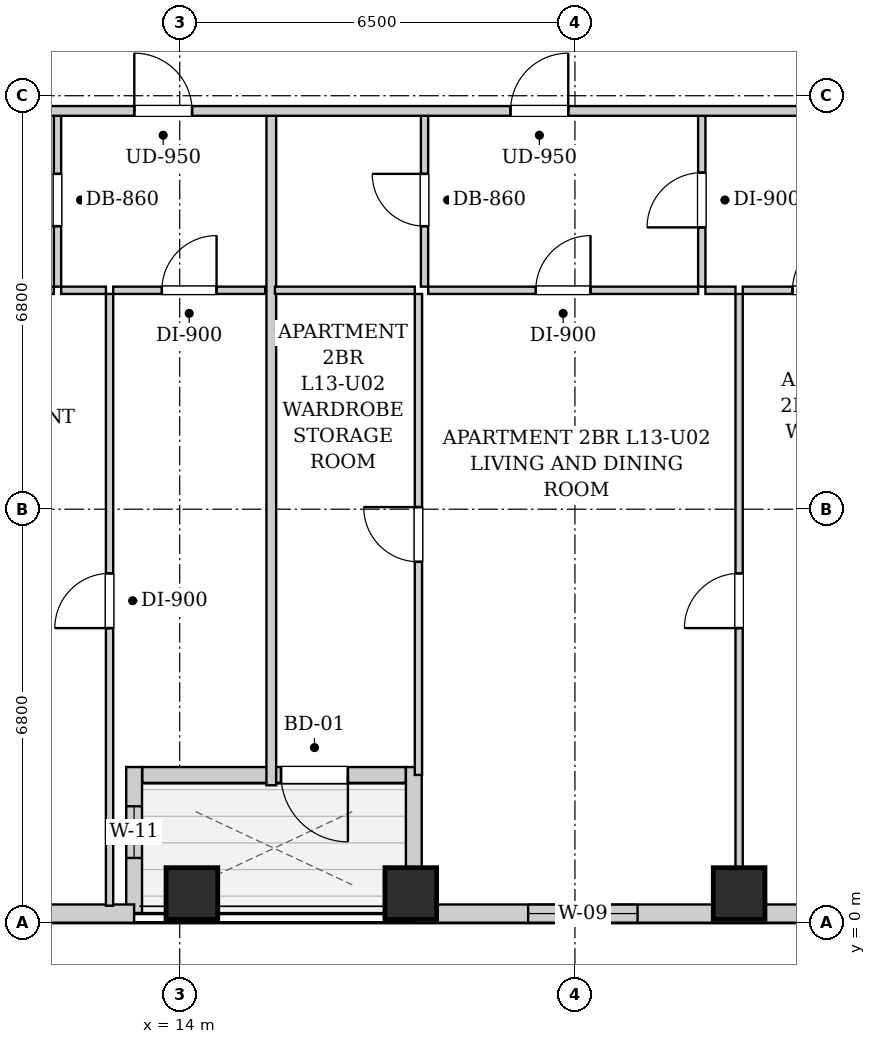
"""IFC4 building model, lengths in metres.
Left out: names, types, materials, properties, quantities, classifications, styles, units other than length and angle.
Written with IfcOpenShell. Run it as: python <this file> out.ifc"""

import sys

from ifc_helpers import new_model, si_unit, direction, frame, frame_2d, origin, origin_2d, place, context, subcontext, project, spatial, rectangle, extrude, element, fill, save


model = new_model("IFC4")
c1 = context("Model", 3, precision=1e-05, world=origin(), true_north=direction((0.0, 1.0)))
c2 = subcontext(c1, "Body", "Model", "MODEL_VIEW")
j1 = project(units=[si_unit("LENGTHUNIT", "METRE"), si_unit("PLANEANGLEUNIT", "RADIAN")], contexts=[c1])
p1 = place(None, origin())
s1 = spatial("IfcSite", under=j1, at=p1, CompositionType="ELEMENT")
p2 = place(p1, origin())
s2 = spatial("IfcBuilding", under=s1, at=p2, CompositionType="ELEMENT")
p3 = place(p2, frame((0.0, 0.0, 51.4)))
s3 = spatial("IfcBuildingStorey", under=s2, at=p3, CompositionType="ELEMENT", Elevation=51.4)
for number, where, z_axis, x_axis in (
    (1, (14.2, 0.48, 0.0), (0.0, 0.0, 1.0), (1.0, 0.0, 0.0)),
    (2, (17.8, 0.48, 0.0), (0.0, 0.0, 1.0), (1.0, 0.0, 0.0)),
    (3, (23.2, 0.48, 0.0), (0.0, 0.0, 1.0), (1.0, 0.0, 0.0)),
):
    element("IfcColumn", number, at=place(p3, frame(where, z_axis=z_axis, x_axis=x_axis)), inside=s3, PredefinedType="COLUMN", context=c2, shape_type="SweptSolid", body=[
        extrude(rectangle(XDim=0.85, YDim=0.85, at=origin_2d()), origin(), (0.0, 0.0, 1.0), 3.2),
    ])
p4 = place(p3, frame((44.0, 0.15, 0.0), z_axis=(0.0, 0.0, 1.0), x_axis=(-1.0, 0.0, 0.0)))
e4 = element("IfcWall", 4, at=p4, inside=s3, PredefinedType="SOLIDWALL", context=c2, shape_type="SweptSolid", body=[
    extrude(rectangle(XDim=26.15, YDim=0.3, at=frame_2d((13.075, 0.0))), origin(), (0.0, 0.0, 1.0), 1.975),
])
p5 = place(p4, frame((22.47, 0.0, 0.55)))
e5 = element("IfcOpeningElement", 5, at=p5, cuts=e4, PredefinedType="OPENING", context=c2, shape_type="SweptSolid", body=[
    extrude(rectangle(XDim=1.8, YDim=1.2, at=frame_2d((0.9, 0.6))), frame((0.0, 0.16, 0.0), z_axis=(0.0, -1.0, 0.0), x_axis=(1.0, 0.0, 0.0)), (0.0, 0.0, 1.0), 0.32),
])
p6 = place(p4, frame((14.354, 0.0, 0.55)))
e6 = element("IfcOpeningElement", 6, at=p6, cuts=e4, PredefinedType="OPENING", context=c2, shape_type="SweptSolid", body=[
    extrude(rectangle(XDim=1.8, YDim=1.2, at=frame_2d((0.9, 0.6))), frame((0.0, 0.16, 0.0), z_axis=(0.0, -1.0, 0.0), x_axis=(1.0, 0.0, 0.0)), (0.0, 0.0, 1.0), 0.32),
])
p7 = place(p4, frame((11.385, 0.0, 0.55)))
e7 = element("IfcOpeningElement", 7, at=p7, cuts=e4, PredefinedType="OPENING", context=c2, shape_type="SweptSolid", body=[
    extrude(rectangle(XDim=1.35, YDim=1.2, at=frame_2d((0.675, 0.6))), frame((0.0, 0.16, 0.0), z_axis=(0.0, -1.0, 0.0), x_axis=(1.0, 0.0, 0.0)), (0.0, 0.0, 1.0), 0.32),
])
p8 = place(p4, frame((6.839, 0.0, 0.55)))
e8 = element("IfcOpeningElement", 8, at=p8, cuts=e4, PredefinedType="OPENING", context=c2, shape_type="SweptSolid", body=[
    extrude(rectangle(XDim=1.8, YDim=1.2, at=frame_2d((0.9, 0.6))), frame((0.0, 0.16, 0.0), z_axis=(0.0, -1.0, 0.0), x_axis=(1.0, 0.0, 0.0)), (0.0, 0.0, 1.0), 0.32),
])
p9 = place(p4, frame((2.332, 0.0, 0.55)))
e9 = element("IfcOpeningElement", 9, at=p9, cuts=e4, PredefinedType="OPENING", context=c2, shape_type="SweptSolid", body=[
    extrude(rectangle(XDim=1.8, YDim=1.2, at=frame_2d((0.9, 0.6))), frame((0.0, 0.16, 0.0), z_axis=(0.0, -1.0, 0.0), x_axis=(1.0, 0.0, 0.0)), (0.0, 0.0, 1.0), 0.32),
])
p10 = place(p3, frame((17.85, 0.16, 0.0), z_axis=(0.0, 0.0, 1.0), x_axis=(0.0, 1.0, 0.0)))
e10 = element("IfcWall", 10, at=p10, inside=s3, PredefinedType="SOLIDWALL", context=c2, shape_type="SweptSolid", body=[
    extrude(rectangle(XDim=2.4, YDim=0.26, at=frame_2d((1.2, 0.0))), origin(), (0.0, 0.0, 1.0), 2.232),
])
p11 = place(p3, frame((17.716, 2.43, 0.0), z_axis=(0.0, 0.0, 1.0), x_axis=(-1.0, 0.0, 0.0)))
e11 = element("IfcWall", 11, at=p11, inside=s3, PredefinedType="SOLIDWALL", context=c2, shape_type="SweptSolid", body=[
    extrude(rectangle(XDim=4.332, YDim=0.26, at=frame_2d((2.166, 0.0))), origin(), (0.0, 0.0, 1.0), 2.94),
])
p12 = place(p11, frame((0.95, 0.0, 0.0)))
e12 = element("IfcOpeningElement", 12, at=p12, cuts=e11, PredefinedType="OPENING", context=c2, shape_type="SweptSolid", body=[
    extrude(rectangle(XDim=1.1, YDim=2.0, at=frame_2d((0.55, 1.0))), frame((0.0, 0.14, 0.0), z_axis=(0.0, -1.0, 0.0), x_axis=(1.0, 0.0, 0.0)), (0.0, 0.0, 1.0), 0.28),
])
p13 = place(p3, frame((13.25, 2.56, 0.0), z_axis=(0.0, 0.0, 1.0), x_axis=(0.0, -1.0, 0.0)))
e13 = element("IfcWall", 13, at=p13, inside=s3, PredefinedType="SOLIDWALL", context=c2, shape_type="SweptSolid", body=[
    extrude(rectangle(XDim=2.4, YDim=0.26, at=frame_2d((1.2, 0.0))), origin(), (0.0, 0.0, 1.0), 2.94),
])
p14 = place(p13, frame((0.645, 0.0, 0.55)))
e14 = element("IfcOpeningElement", 14, at=p14, cuts=e13, PredefinedType="OPENING", context=c2, shape_type="SweptSolid", body=[
    extrude(rectangle(XDim=0.85, YDim=1.2, at=frame_2d((0.425, 0.6))), frame((0.0, 0.14, 0.0), z_axis=(0.0, -1.0, 0.0), x_axis=(1.0, 0.0, 0.0)), (0.0, 0.0, 1.0), 0.28),
])
p15 = place(p3, frame((13.25, 0.15, 0.0), z_axis=(0.0, 0.0, 1.0), x_axis=(-1.0, 0.0, 0.0)))
e15 = element("IfcWall", 15, at=p15, inside=s3, PredefinedType="SOLIDWALL", context=c2, shape_type="SweptSolid", body=[
    extrude(rectangle(XDim=3.25, YDim=0.3, at=frame_2d((1.625, 0.0))), origin(), (0.0, 0.0, 1.0), 1.975),
])
p16 = place(p3, frame((11.99, 10.46, 0.0), z_axis=(0.0, 0.0, 1.0), x_axis=(0.0, 1.0, 0.0)))
e16 = element("IfcWall", 16, at=p16, inside=s3, PredefinedType="PARTITIONING", context=c2, shape_type="SweptSolid", body=[
    extrude(rectangle(XDim=2.85, YDim=0.12, at=frame_2d((1.425, 0.0))), origin(), (0.0, 0.0, 1.0), 2.94),
])
p17 = place(p16, frame((0.995, 0.0, 0.0)))
e17 = element("IfcOpeningElement", 17, at=p17, cuts=e16, PredefinedType="OPENING", context=c2, shape_type="SweptSolid", body=[
    extrude(rectangle(XDim=0.86, YDim=2.05, at=frame_2d((0.43, 1.025))), frame((0.0, 0.07, 0.0), z_axis=(0.0, -1.0, 0.0), x_axis=(1.0, 0.0, 0.0)), (0.0, 0.0, 1.0), 0.14),
])
p18 = place(p3, frame((10.08, 10.4, 0.0), z_axis=(0.0, 0.0, 1.0), x_axis=(1.0, 0.0, 0.0)))
e18 = element("IfcWall", 18, at=p18, inside=s3, PredefinedType="PARTITIONING", context=c2, shape_type="SweptSolid", body=[
    extrude(rectangle(XDim=1.85, YDim=0.12, at=frame_2d((0.925, 0.0))), origin(), (0.0, 0.0, 1.0), 2.94),
])
p19 = place(p3, frame((12.05, 10.4, 0.0), z_axis=(0.0, 0.0, 1.0), x_axis=(1.0, 0.0, 0.0)))
e19 = element("IfcWall", 19, at=p19, inside=s3, PredefinedType="PARTITIONING", context=c2, shape_type="SweptSolid", body=[
    extrude(rectangle(XDim=0.736, YDim=0.12, at=frame_2d((0.368, 0.0))), origin(), (0.0, 0.0, 1.0), 2.94),
])
p20 = place(p3, frame((12.906, 10.4, 0.0), z_axis=(0.0, 0.0, 1.0), x_axis=(1.0, 0.0, 0.0)))
e20 = element("IfcWall", 20, at=p20, inside=s3, PredefinedType="PARTITIONING", context=c2, shape_type="SweptSolid", body=[
    extrude(rectangle(XDim=2.5, YDim=0.12, at=frame_2d((1.25, 0.0))), origin(), (0.0, 0.0, 1.0), 2.94),
])
p21 = place(p20, frame((0.8, 0.0, 0.0)))
e21 = element("IfcOpeningElement", 21, at=p21, cuts=e20, PredefinedType="OPENING", context=c2, shape_type="SweptSolid", body=[
    extrude(rectangle(XDim=0.9, YDim=2.05, at=frame_2d((0.45, 1.025))), frame((0.0, 0.07, 0.0), z_axis=(0.0, -1.0, 0.0), x_axis=(1.0, 0.0, 0.0)), (0.0, 0.0, 1.0), 0.14),
])
p22 = place(p3, frame((12.846, 0.28, 0.0), z_axis=(0.0, 0.0, 1.0), x_axis=(0.0, 1.0, 0.0)))
e22 = element("IfcWall", 22, at=p22, inside=s3, PredefinedType="PARTITIONING", context=c2, shape_type="SweptSolid", body=[
    extrude(rectangle(XDim=10.06, YDim=0.12, at=frame_2d((5.03, 0.0))), origin(), (0.0, 0.0, 1.0), 2.94),
])
p23 = place(p22, frame((4.565, 0.0, 0.0)))
e23 = element("IfcOpeningElement", 23, at=p23, cuts=e22, PredefinedType="OPENING", context=c2, shape_type="SweptSolid", body=[
    extrude(rectangle(XDim=0.9, YDim=2.05, at=frame_2d((0.45, 1.025))), frame((0.0, 0.07, 0.0), z_axis=(0.0, -1.0, 0.0), x_axis=(1.0, 0.0, 0.0)), (0.0, 0.0, 1.0), 0.14),
])
p24 = place(p3, frame((15.506, 2.26, 0.0), z_axis=(0.0, 0.0, 1.0), x_axis=(0.0, 1.0, 0.0)))
e24 = element("IfcWall", 24, at=p24, inside=s3, PredefinedType="PARTITIONING", context=c2, shape_type="SweptSolid", body=[
    extrude(rectangle(XDim=11.05, YDim=0.16, at=frame_2d((5.525, 0.0))), origin(), (0.0, 0.0, 1.0), 2.94),
])
p25 = place(p3, frame((18.026, 10.46, 0.0), z_axis=(0.0, 0.0, 1.0), x_axis=(0.0, 1.0, 0.0)))
e25 = element("IfcWall", 25, at=p25, inside=s3, PredefinedType="PARTITIONING", context=c2, shape_type="SweptSolid", body=[
    extrude(rectangle(XDim=2.85, YDim=0.12, at=frame_2d((1.425, 0.0))), origin(), (0.0, 0.0, 1.0), 2.94),
])
p26 = place(p25, frame((0.995, 0.0, 0.0)))
e26 = element("IfcOpeningElement", 26, at=p26, cuts=e25, PredefinedType="OPENING", context=c2, shape_type="SweptSolid", body=[
    extrude(rectangle(XDim=0.86, YDim=2.05, at=frame_2d((0.43, 1.025))), frame((0.0, 0.07, 0.0), z_axis=(0.0, -1.0, 0.0), x_axis=(1.0, 0.0, 0.0)), (0.0, 0.0, 1.0), 0.14),
])
p27 = place(p3, frame((15.566, 10.4, 0.0), z_axis=(0.0, 0.0, 1.0), x_axis=(1.0, 0.0, 0.0)))
e27 = element("IfcWall", 27, at=p27, inside=s3, PredefinedType="PARTITIONING", context=c2, shape_type="SweptSolid", body=[
    extrude(rectangle(XDim=2.3, YDim=0.12, at=frame_2d((1.15, 0.0))), origin(), (0.0, 0.0, 1.0), 2.94),
])
p28 = place(p3, frame((22.586, 10.46, 0.0), z_axis=(0.0, 0.0, 1.0), x_axis=(0.0, 1.0, 0.0)))
e28 = element("IfcWall", 28, at=p28, inside=s3, PredefinedType="PARTITIONING", context=c2, shape_type="SweptSolid", body=[
    extrude(rectangle(XDim=2.85, YDim=0.12, at=frame_2d((1.425, 0.0))), origin(), (0.0, 0.0, 1.0), 2.94),
])
p29 = place(p28, frame((0.975, 0.0, 0.0)))
e29 = element("IfcOpeningElement", 29, at=p29, cuts=e28, PredefinedType="OPENING", context=c2, shape_type="SweptSolid", body=[
    extrude(rectangle(XDim=0.9, YDim=2.05, at=frame_2d((0.45, 1.025))), frame((0.0, 0.07, 0.0), z_axis=(0.0, -1.0, 0.0), x_axis=(1.0, 0.0, 0.0)), (0.0, 0.0, 1.0), 0.14),
])
p30 = place(p3, frame((18.086, 10.4, 0.0), z_axis=(0.0, 0.0, 1.0), x_axis=(1.0, 0.0, 0.0)))
e30 = element("IfcWall", 30, at=p30, inside=s3, PredefinedType="PARTITIONING", context=c2, shape_type="SweptSolid", body=[
    extrude(rectangle(XDim=4.44, YDim=0.12, at=frame_2d((2.22, 0.0))), origin(), (0.0, 0.0, 1.0), 2.94),
])
p31 = place(p30, frame((1.77, 0.0, 0.0)))
e31 = element("IfcOpeningElement", 31, at=p31, cuts=e30, PredefinedType="OPENING", context=c2, shape_type="SweptSolid", body=[
    extrude(rectangle(XDim=0.9, YDim=2.05, at=frame_2d((0.45, 1.025))), frame((0.0, 0.07, 0.0), z_axis=(0.0, -1.0, 0.0), x_axis=(1.0, 0.0, 0.0)), (0.0, 0.0, 1.0), 0.14),
])
p32 = place(p3, frame((22.646, 10.4, 0.0), z_axis=(0.0, 0.0, 1.0), x_axis=(1.0, 0.0, 0.0)))
e32 = element("IfcWall", 32, at=p32, inside=s3, PredefinedType="PARTITIONING", context=c2, shape_type="SweptSolid", body=[
    extrude(rectangle(XDim=0.494, YDim=0.12, at=frame_2d((0.247, 0.0))), origin(), (0.0, 0.0, 1.0), 2.94),
])
p33 = place(p3, frame((23.26, 10.4, 0.0), z_axis=(0.0, 0.0, 1.0), x_axis=(1.0, 0.0, 0.0)))
e33 = element("IfcWall", 33, at=p33, inside=s3, PredefinedType="PARTITIONING", context=c2, shape_type="SweptSolid", body=[
    extrude(rectangle(XDim=2.536, YDim=0.12, at=frame_2d((1.268, 0.0))), origin(), (0.0, 0.0, 1.0), 2.94),
])
p34 = place(p33, frame((0.818, 0.0, 0.0)))
e34 = element("IfcOpeningElement", 34, at=p34, cuts=e33, PredefinedType="OPENING", context=c2, shape_type="SweptSolid", body=[
    extrude(rectangle(XDim=0.9, YDim=2.05, at=frame_2d((0.45, 1.025))), frame((0.0, 0.07, 0.0), z_axis=(0.0, -1.0, 0.0), x_axis=(1.0, 0.0, 0.0)), (0.0, 0.0, 1.0), 0.14),
])
p35 = place(p3, frame((17.926, 2.43, 0.0), z_axis=(0.0, 0.0, 1.0), x_axis=(0.0, 1.0, 0.0)))
e35 = element("IfcWall", 35, at=p35, inside=s3, PredefinedType="PARTITIONING", context=c2, shape_type="SweptSolid", body=[
    extrude(rectangle(XDim=7.91, YDim=0.12, at=frame_2d((3.955, 0.0))), origin(), (0.0, 0.0, 1.0), 2.232),
])
p36 = place(p35, frame((3.505, 0.0, 0.0)))
e36 = element("IfcOpeningElement", 36, at=p36, cuts=e35, PredefinedType="OPENING", context=c2, shape_type="SweptSolid", body=[
    extrude(rectangle(XDim=0.9, YDim=2.05, at=frame_2d((0.45, 1.025))), frame((0.0, 0.07, 0.0), z_axis=(0.0, -1.0, 0.0), x_axis=(1.0, 0.0, 0.0)), (0.0, 0.0, 1.0), 0.14),
])
p37 = place(p3, frame((23.2, 0.28, 0.0), z_axis=(0.0, 0.0, 1.0), x_axis=(0.0, 1.0, 0.0)))
e37 = element("IfcWall", 37, at=p37, inside=s3, PredefinedType="PARTITIONING", context=c2, shape_type="SweptSolid", body=[
    extrude(rectangle(XDim=10.06, YDim=0.12, at=frame_2d((5.03, 0.0))), origin(), (0.0, 0.0, 1.0), 2.94),
])
p38 = place(p37, frame((4.565, 0.0, 0.0)))
e38 = element("IfcOpeningElement", 38, at=p38, cuts=e37, PredefinedType="OPENING", context=c2, shape_type="SweptSolid", body=[
    extrude(rectangle(XDim=0.9, YDim=2.05, at=frame_2d((0.45, 1.025))), frame((0.0, 0.07, 0.0), z_axis=(0.0, -1.0, 0.0), x_axis=(1.0, 0.0, 0.0)), (0.0, 0.0, 1.0), 0.14),
])
p39 = place(p3, frame((10.05, 13.35, 0.0), z_axis=(0.0, 0.0, 1.0), x_axis=(1.0, 0.0, 0.0)))
e39 = element("IfcWall", 39, at=p39, inside=s3, PredefinedType="PARTITIONING", context=c2, shape_type="SweptSolid", body=[
    extrude(rectangle(XDim=33.9, YDim=0.16, at=frame_2d((16.95, 0.0))), origin(), (0.0, 0.0, 1.0), 2.94),
])
p40 = place(p39, frame((3.203, 0.0, 0.0)))
e40 = element("IfcOpeningElement", 40, at=p40, cuts=e39, PredefinedType="OPENING", context=c2, shape_type="SweptSolid", body=[
    extrude(rectangle(XDim=0.95, YDim=2.1, at=frame_2d((0.475, 1.05))), frame((0.0, 0.09, 0.0), z_axis=(0.0, -1.0, 0.0), x_axis=(1.0, 0.0, 0.0)), (0.0, 0.0, 1.0), 0.18),
])
p41 = place(p39, frame((9.39, 0.0, 0.0)))
e41 = element("IfcOpeningElement", 41, at=p41, cuts=e39, PredefinedType="OPENING", context=c2, shape_type="SweptSolid", body=[
    extrude(rectangle(XDim=0.95, YDim=2.1, at=frame_2d((0.475, 1.05))), frame((0.0, 0.09, 0.0), z_axis=(0.0, -1.0, 0.0), x_axis=(1.0, 0.0, 0.0)), (0.0, 0.0, 1.0), 0.18),
])
p42 = place(p39, frame((28.476, 0.0, 0.0)))
e42 = element("IfcOpeningElement", 42, at=p42, cuts=e39, PredefinedType="OPENING", context=c2, shape_type="SweptSolid", body=[
    extrude(rectangle(XDim=0.95, YDim=2.1, at=frame_2d((0.475, 1.05))), frame((0.0, 0.09, 0.0), z_axis=(0.0, -1.0, 0.0), x_axis=(1.0, 0.0, 0.0)), (0.0, 0.0, 1.0), 0.18),
])
p43 = place(p17, origin())
e43 = element("IfcDoor", 43, at=p43, inside=s3, OperationType="SINGLE_SWING_LEFT", PredefinedType="DOOR", context=c2, shape_type="SweptSolid", body=[
    extrude(rectangle(XDim=0.86, YDim=2.05, at=frame_2d((0.43, 1.025))), frame((0.0, 0.025, 0.0), z_axis=(0.0, -1.0, 0.0), x_axis=(1.0, 0.0, 0.0)), (0.0, 0.0, 1.0), 0.05),
])
fill(e17, e43)
p44 = place(p21, origin())
e44 = element("IfcDoor", 44, at=p44, inside=s3, OperationType="SINGLE_SWING_RIGHT", PredefinedType="DOOR", context=c2, shape_type="SweptSolid", body=[
    extrude(rectangle(XDim=0.9, YDim=2.05, at=frame_2d((0.45, 1.025))), frame((0.0, 0.025, 0.0), z_axis=(0.0, -1.0, 0.0), x_axis=(1.0, 0.0, 0.0)), (0.0, 0.0, 1.0), 0.05),
])
fill(e21, e44)
p45 = place(p23, origin())
e45 = element("IfcDoor", 45, at=p45, inside=s3, OperationType="SINGLE_SWING_LEFT", PredefinedType="DOOR", context=c2, shape_type="SweptSolid", body=[
    extrude(rectangle(XDim=0.9, YDim=2.05, at=frame_2d((0.45, 1.025))), frame((0.0, 0.025, 0.0), z_axis=(0.0, -1.0, 0.0), x_axis=(1.0, 0.0, 0.0)), (0.0, 0.0, 1.0), 0.05),
])
fill(e23, e45)
p46 = place(p26, origin())
e46 = element("IfcDoor", 46, at=p46, inside=s3, OperationType="SINGLE_SWING_RIGHT", PredefinedType="DOOR", context=c2, shape_type="SweptSolid", body=[
    extrude(rectangle(XDim=0.86, YDim=2.05, at=frame_2d((0.43, 1.025))), frame((0.0, 0.025, 0.0), z_axis=(0.0, -1.0, 0.0), x_axis=(1.0, 0.0, 0.0)), (0.0, 0.0, 1.0), 0.05),
])
fill(e26, e46)
p47 = place(p29, origin())
e47 = element("IfcDoor", 47, at=p47, inside=s3, OperationType="SINGLE_SWING_LEFT", PredefinedType="DOOR", context=c2, shape_type="SweptSolid", body=[
    extrude(rectangle(XDim=0.9, YDim=2.05, at=frame_2d((0.45, 1.025))), frame((0.0, 0.025, 0.0), z_axis=(0.0, -1.0, 0.0), x_axis=(1.0, 0.0, 0.0)), (0.0, 0.0, 1.0), 0.05),
])
fill(e29, e47)
p48 = place(p31, origin())
e48 = element("IfcDoor", 48, at=p48, inside=s3, OperationType="SINGLE_SWING_RIGHT", PredefinedType="DOOR", context=c2, shape_type="SweptSolid", body=[
    extrude(rectangle(XDim=0.9, YDim=2.05, at=frame_2d((0.45, 1.025))), frame((0.0, 0.025, 0.0), z_axis=(0.0, -1.0, 0.0), x_axis=(1.0, 0.0, 0.0)), (0.0, 0.0, 1.0), 0.05),
])
fill(e31, e48)
p49 = place(p34, origin())
e49 = element("IfcDoor", 49, at=p49, inside=s3, OperationType="SINGLE_SWING_RIGHT", PredefinedType="DOOR", context=c2, shape_type="SweptSolid", body=[
    extrude(rectangle(XDim=0.9, YDim=2.05, at=frame_2d((0.45, 1.025))), frame((0.0, 0.025, 0.0), z_axis=(0.0, -1.0, 0.0), x_axis=(1.0, 0.0, 0.0)), (0.0, 0.0, 1.0), 0.05),
])
fill(e34, e49)
p50 = place(p36, origin())
e50 = element("IfcDoor", 50, at=p50, inside=s3, OperationType="SINGLE_SWING_RIGHT", PredefinedType="DOOR", context=c2, shape_type="SweptSolid", body=[
    extrude(rectangle(XDim=0.9, YDim=2.05, at=frame_2d((0.45, 1.025))), frame((0.0, 0.025, 0.0), z_axis=(0.0, -1.0, 0.0), x_axis=(1.0, 0.0, 0.0)), (0.0, 0.0, 1.0), 0.05),
])
fill(e36, e50)
p51 = place(p38, origin())
e51 = element("IfcDoor", 51, at=p51, inside=s3, OperationType="SINGLE_SWING_LEFT", PredefinedType="DOOR", context=c2, shape_type="SweptSolid", body=[
    extrude(rectangle(XDim=0.9, YDim=2.05, at=frame_2d((0.45, 1.025))), frame((0.0, 0.025, 0.0), z_axis=(0.0, -1.0, 0.0), x_axis=(1.0, 0.0, 0.0)), (0.0, 0.0, 1.0), 0.05),
])
fill(e38, e51)
p52 = place(p40, origin())
e52 = element("IfcDoor", 52, at=p52, inside=s3, OperationType="SINGLE_SWING_LEFT", PredefinedType="DOOR", context=c2, shape_type="SweptSolid", body=[
    extrude(rectangle(XDim=0.95, YDim=2.1, at=frame_2d((0.475, 1.05))), frame((0.0, 0.025, 0.0), z_axis=(0.0, -1.0, 0.0), x_axis=(1.0, 0.0, 0.0)), (0.0, 0.0, 1.0), 0.05),
])
fill(e40, e52)
p53 = place(p41, origin())
e53 = element("IfcDoor", 53, at=p53, inside=s3, OperationType="SINGLE_SWING_RIGHT", PredefinedType="DOOR", context=c2, shape_type="SweptSolid", body=[
    extrude(rectangle(XDim=0.95, YDim=2.1, at=frame_2d((0.475, 1.05))), frame((0.0, 0.025, 0.0), z_axis=(0.0, -1.0, 0.0), x_axis=(1.0, 0.0, 0.0)), (0.0, 0.0, 1.0), 0.05),
])
fill(e41, e53)
p54 = place(p12, origin())
e54 = element("IfcDoor", 54, at=p54, inside=s3, OperationType="SINGLE_SWING_LEFT", PredefinedType="DOOR", context=c2, shape_type="SweptSolid", body=[
    extrude(rectangle(XDim=1.1, YDim=2.0, at=frame_2d((0.55, 1.0))), frame((0.0, 0.025, 0.0), z_axis=(0.0, -1.0, 0.0), x_axis=(1.0, 0.0, 0.0)), (0.0, 0.0, 1.0), 0.05),
])
fill(e12, e54)
p55 = place(p14, origin())
e55 = element("IfcWindow", 55, at=p55, inside=s3, PartitioningType="SINGLE_PANEL", PredefinedType="WINDOW", context=c2, shape_type="SweptSolid", body=[
    extrude(rectangle(XDim=0.85, YDim=1.2, at=frame_2d((0.425, 0.6))), frame((0.0, 0.03, 0.0), z_axis=(0.0, -1.0, 0.0), x_axis=(1.0, 0.0, 0.0)), (0.0, 0.0, 1.0), 0.06),
])
fill(e14, e55)
p56 = place(p5, origin())
e56 = element("IfcWindow", 56, at=p56, inside=s3, PartitioningType="DOUBLE_PANEL_VERTICAL", PredefinedType="WINDOW", context=c2, shape_type="SweptSolid", body=[
    extrude(rectangle(XDim=1.8, YDim=1.2, at=frame_2d((0.9, 0.6))), frame((0.0, 0.03, 0.0), z_axis=(0.0, -1.0, 0.0), x_axis=(1.0, 0.0, 0.0)), (0.0, 0.0, 1.0), 0.06),
])
fill(e5, e56)
save(model, sys.argv[1])
